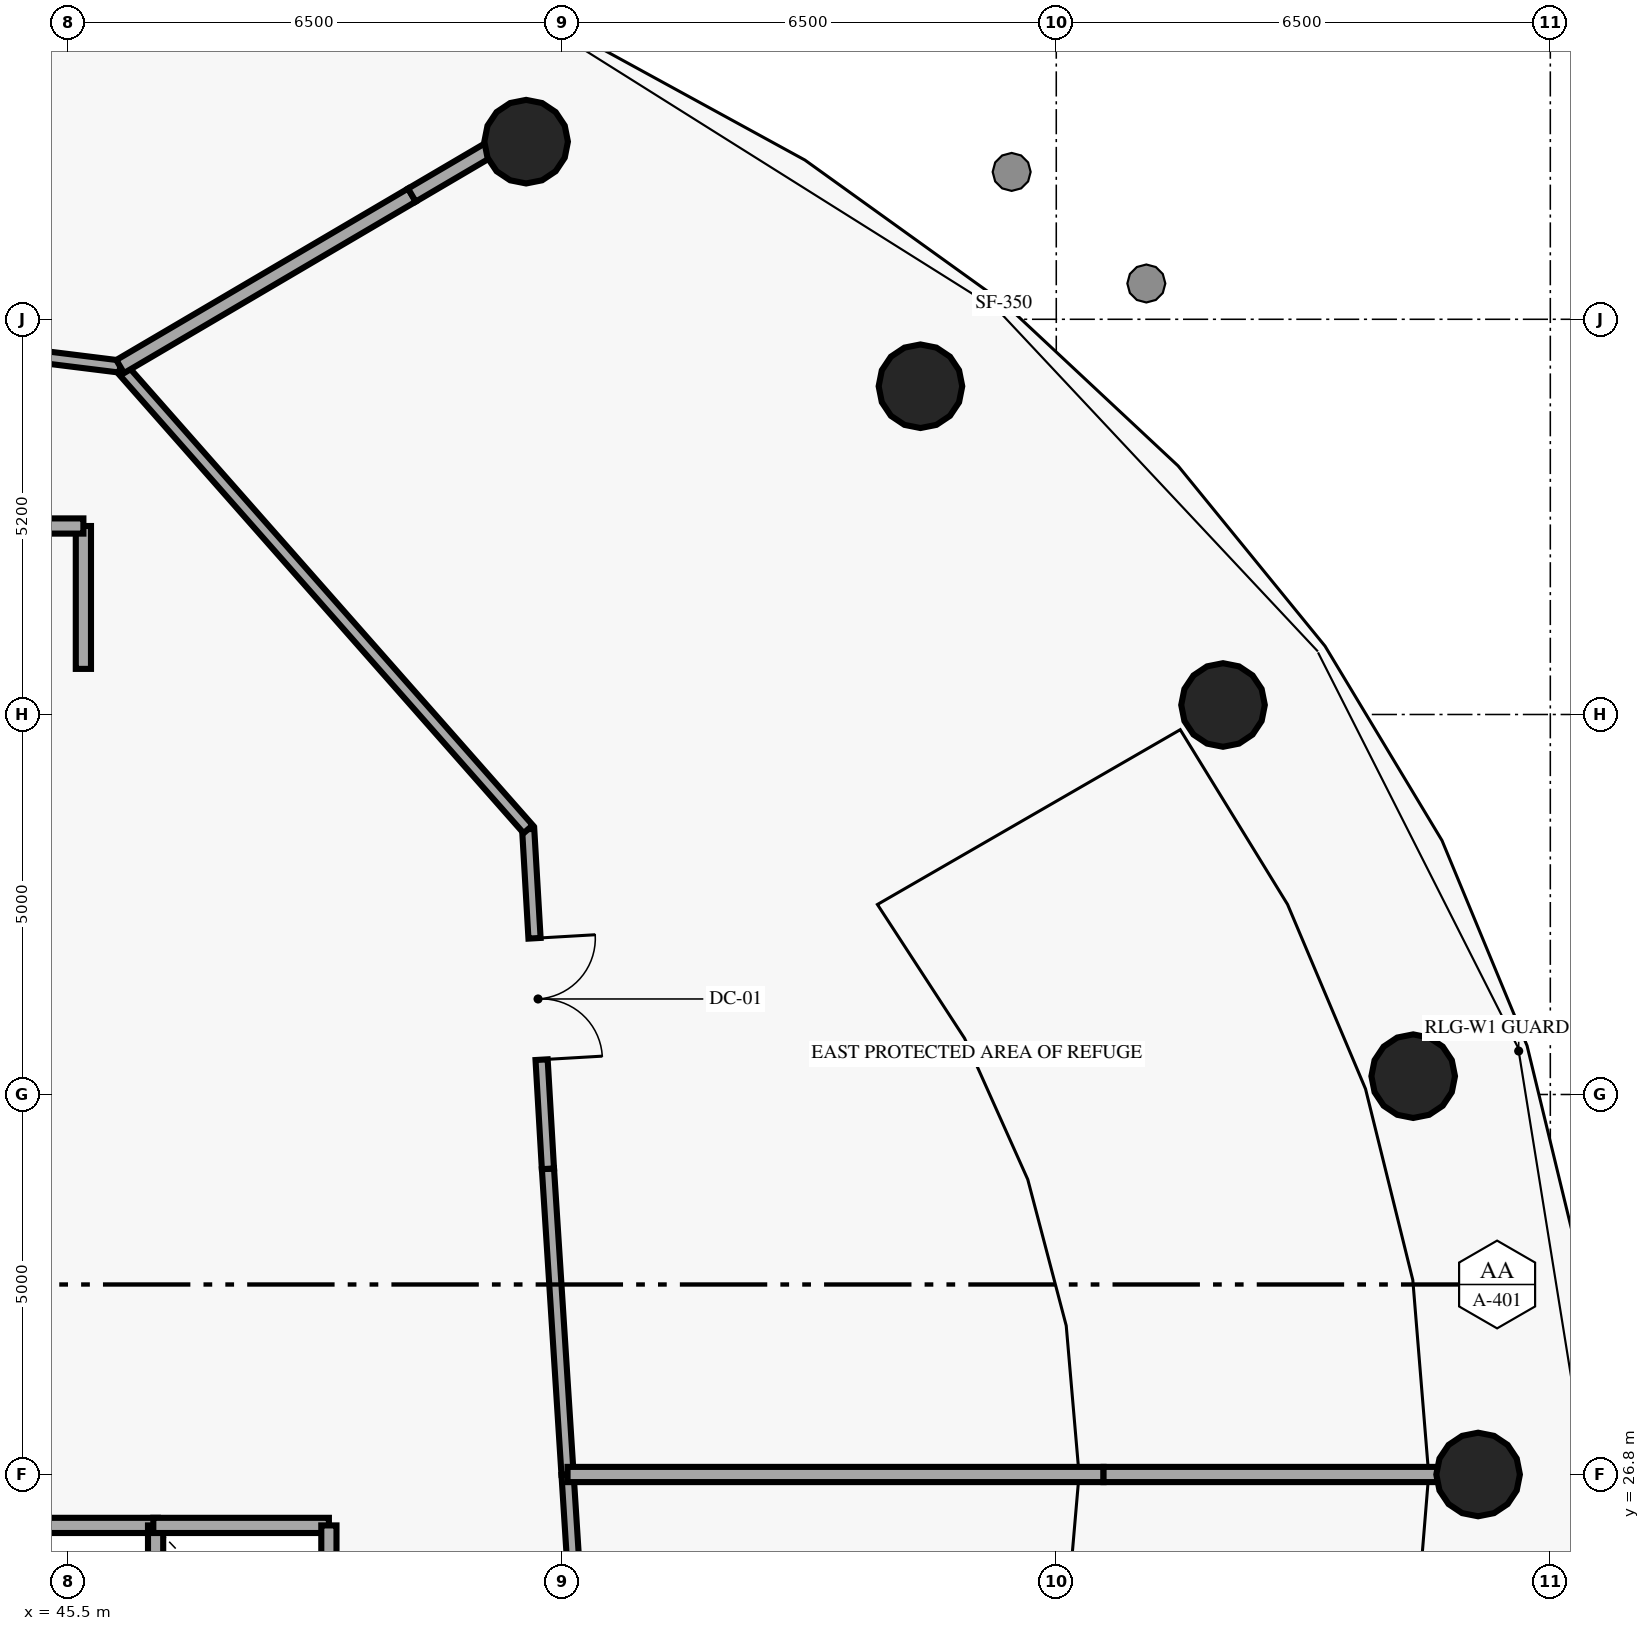
"""IFC4 building model, lengths in metres.
Left out: names, types, materials, properties, quantities, classifications, styles, units other than length and angle.
Written with IfcOpenShell. Run it as: python <this file> out.ifc"""

import sys

from ifc_helpers import new_model, si_unit, direction, frame, frame_2d, origin, origin_2d, place, context, subcontext, project, spatial, rectangle, circle, extrude, element, fill, save


model = new_model("IFC4")
c1 = context("Model", 3, precision=1e-05, world=origin(), true_north=direction((0.0, 1.0)))
c2 = subcontext(c1, "Body", "Model", "MODEL_VIEW")
j1 = project(units=[si_unit("LENGTHUNIT", "METRE"), si_unit("PLANEANGLEUNIT", "RADIAN")], contexts=[c1])
p1 = place(None, origin())
s1 = spatial("IfcSite", under=j1, at=p1, CompositionType="ELEMENT")
p2 = place(p1, origin())
s2 = spatial("IfcBuilding", under=s1, at=p2, CompositionType="ELEMENT")
p3 = place(p2, frame((0.0, 0.0, 106.05)))
s3 = spatial("IfcBuildingStorey", under=s2, at=p3, CompositionType="ELEMENT", Elevation=106.05)
for number, where, z_axis, x_axis in (
    (1, (64.05, 26.8, 0.0), (0.0, 0.0, 1.0), (1.0, 0.0, 0.0)),
    (2, (63.196, 32.041, 0.0), (0.0, 0.0, 1.0), (1.0, 0.0, 0.0)),
    (3, (60.694, 36.925, 0.0), (0.0, 0.0, 1.0), (1.0, 0.0, 0.0)),
    (4, (56.713, 41.119, 0.0), (0.0, 0.0, 1.0), (1.0, 0.0, 0.0)),
    (5, (51.525, 44.337, 0.0), (0.0, 0.0, 1.0), (1.0, 0.0, 0.0)),
):
    element("IfcColumn", number, at=place(p3, frame(where, z_axis=z_axis, x_axis=x_axis)), inside=s3, PredefinedType="COLUMN", context=c2, shape_type="SweptSolid", body=[
        extrude(circle(Radius=0.55, at=origin_2d()), origin(), (0.0, 0.0, 1.0), 6.88),
    ])
p4 = place(p3, frame((45.7, 37.4, 0.0), z_axis=(0.0, 0.0, 1.0), x_axis=(0.0, 1.0, 0.0)))
e6 = element("IfcWall", 6, at=p4, inside=s3, PredefinedType="SOLIDWALL", context=c2, shape_type="SweptSolid", body=[
    extrude(rectangle(XDim=1.88, YDim=0.2, at=frame_2d((0.94, 0.0))), origin(), (0.0, 0.0, 1.0), 6.88),
])
p5 = place(p3, frame((45.7, 39.28, 0.0), z_axis=(0.0, 0.0, 1.0), x_axis=(-1.0, 0.0, 0.0)))
e7 = element("IfcWall", 7, at=p5, inside=s3, PredefinedType="SOLIDWALL", context=c2, shape_type="SweptSolid", body=[
    extrude(rectangle(XDim=6.6, YDim=0.2, at=frame_2d((3.3, 0.0))), origin(), (0.0, 0.0, 1.0), 6.88),
])
p6 = place(p5, frame((4.35, 0.0, 0.0)))
e8 = element("IfcOpeningElement", 8, at=p6, cuts=e7, PredefinedType="OPENING", context=c2, shape_type="SweptSolid", body=[
    extrude(rectangle(XDim=1.6, YDim=2.2, at=frame_2d((0.8, 1.1))), frame((0.0, 0.11, 0.0), z_axis=(0.0, -1.0, 0.0), x_axis=(1.0, 0.0, 0.0)), (0.0, 0.0, 1.0), 0.22),
])
p7 = place(p3, frame((44.57, 26.13, 0.0), z_axis=(0.0, 0.0, 1.0), x_axis=(1.0, 0.0, 0.0)))
e9 = element("IfcWall", 9, at=p7, inside=s3, PredefinedType="SOLIDWALL", context=c2, shape_type="SweptSolid", body=[
    extrude(rectangle(XDim=2.11, YDim=0.2, at=frame_2d((1.055, 0.0))), origin(), (0.0, 0.0, 1.0), 6.88),
])
p8 = place(p3, frame((46.65, 23.72, 0.0), z_axis=(0.0, 0.0, 1.0), x_axis=(0.0, 1.0, 0.0)))
e10 = element("IfcWall", 10, at=p8, inside=s3, PredefinedType="SOLIDWALL", context=c2, shape_type="SweptSolid", body=[
    extrude(rectangle(XDim=2.41, YDim=0.2, at=frame_2d((1.205, 0.0))), origin(), (0.0, 0.0, 1.0), 6.88),
])
p9 = place(p3, frame((46.62, 26.13, 0.0), z_axis=(0.0, 0.0, 1.0), x_axis=(1.0, 0.0, 0.0)))
e11 = element("IfcWall", 11, at=p9, inside=s3, PredefinedType="SOLIDWALL", context=c2, shape_type="SweptSolid", body=[
    extrude(rectangle(XDim=2.31, YDim=0.2, at=frame_2d((1.155, 0.0))), origin(), (0.0, 0.0, 1.0), 6.88),
])
p10 = place(p3, frame((48.93, 23.72, 0.0), z_axis=(0.0, 0.0, 1.0), x_axis=(0.0, 1.0, 0.0)))
e12 = element("IfcWall", 12, at=p10, inside=s3, PredefinedType="SOLIDWALL", context=c2, shape_type="SweptSolid", body=[
    extrude(rectangle(XDim=2.41, YDim=0.2, at=frame_2d((1.205, 0.0))), origin(), (0.0, 0.0, 1.0), 6.88),
])
p11 = place(p3, frame((52.07, 26.8, 0.0), z_axis=(0.0, 0.0, 1.0), x_axis=(-0.064030047677, 0.997947971086, 0.0)))
e13 = element("IfcWall", 13, at=p11, inside=s3, PredefinedType="PARTITIONING", context=c2, shape_type="SweptSolid", body=[
    extrude(rectangle(XDim=4.03, YDim=0.16, at=frame_2d((2.015, 0.0))), origin(), (0.0, 0.0, 1.0), 6.88),
])
p12 = place(p3, frame((51.552, 35.291, 0.0), z_axis=(0.0, 0.0, 1.0), x_axis=(0.058082602913, -0.998311780577, 0.0)))
e14 = element("IfcWall", 14, at=p12, inside=s3, PredefinedType="PARTITIONING", context=c2, shape_type="SweptSolid", body=[
    extrude(rectangle(XDim=4.477, YDim=0.16, at=frame_2d((2.238, 0.0))), origin(), (0.0, 0.0, 1.0), 6.88),
])
p13 = place(p12, frame((1.438, 0.0, 0.0)))
e15 = element("IfcOpeningElement", 15, at=p13, cuts=e14, PredefinedType="OPENING", context=c2, shape_type="SweptSolid", body=[
    extrude(rectangle(XDim=1.6, YDim=2.2, at=frame_2d((0.8, 1.1))), frame((0.0, 0.09, 0.0), z_axis=(0.0, -1.0, 0.0), x_axis=(1.0, 0.0, 0.0)), (0.0, 0.0, 1.0), 0.18),
])
p14 = place(p3, frame((51.552, 35.291, 0.0), z_axis=(0.0, 0.0, 1.0), x_axis=(-0.661421630005, 0.750014284772, 0.0)))
e16 = element("IfcWall", 16, at=p14, inside=s3, PredefinedType="PARTITIONING", context=c2, shape_type="SweptSolid", body=[
    extrude(rectangle(XDim=8.116, YDim=0.16, at=frame_2d((4.058, 0.0))), origin(), (0.0, 0.0, 1.0), 6.88),
])
p15 = place(p3, frame((46.184, 41.378, 0.0), z_axis=(0.0, 0.0, 1.0), x_axis=(-0.992378204756, 0.12322945559, 0.0)))
e17 = element("IfcWall", 17, at=p15, inside=s3, PredefinedType="PARTITIONING", context=c2, shape_type="SweptSolid", body=[
    extrude(rectangle(XDim=7.239, YDim=0.16, at=frame_2d((3.62, 0.0))), origin(), (0.0, 0.0, 1.0), 6.88),
])
p16 = place(p3, frame((52.337, 22.614, 0.0), z_axis=(0.0, 0.0, 1.0), x_axis=(-0.063617518313, 0.997974354061, 0.0)))
e18 = element("IfcWall", 18, at=p16, inside=s3, PredefinedType="PARTITIONING", context=c2, shape_type="SweptSolid", body=[
    extrude(rectangle(XDim=4.195, YDim=0.16, at=frame_2d((2.097, 0.0))), origin(), (0.0, 0.0, 1.0), 6.88),
])
p17 = place(p3, frame((52.07, 26.8, 0.0), z_axis=(0.0, 0.0, 1.0), x_axis=(1.0, 0.0, 0.0)))
e19 = element("IfcWall", 19, at=p17, inside=s3, PredefinedType="SOLIDWALL", context=c2, shape_type="SweptSolid", body=[
    extrude(rectangle(XDim=7.052, YDim=0.2, at=frame_2d((3.526, 0.0))), origin(), (0.0, 0.0, 1.0), 6.88),
])
p18 = place(p3, frame((59.122, 26.8, 0.0), z_axis=(0.0, 0.0, 1.0), x_axis=(1.0, 0.0, 0.0)))
e20 = element("IfcWall", 20, at=p18, inside=s3, PredefinedType="SOLIDWALL", context=c2, shape_type="SweptSolid", body=[
    extrude(rectangle(XDim=5.243, YDim=0.2, at=frame_2d((2.622, 0.0))), origin(), (0.0, 0.0, 1.0), 4.88),
])
p19 = place(p3, frame((46.184, 41.378, 0.0), z_axis=(0.0, 0.0, 1.0), x_axis=(0.862079385068, 0.506773256833, 0.0)))
e21 = element("IfcWall", 21, at=p19, inside=s3, PredefinedType="SOLIDWALL", context=c2, shape_type="SweptSolid", body=[
    extrude(rectangle(XDim=4.452, YDim=0.2, at=frame_2d((2.226, 0.0))), origin(), (0.0, 0.0, 1.0), 6.88),
])
p20 = place(p3, frame((50.022, 43.634, 0.0), z_axis=(0.0, 0.0, 1.0), x_axis=(0.862175171179, 0.506610278421, 0.0)))
e22 = element("IfcWall", 22, at=p20, inside=s3, PredefinedType="SOLIDWALL", context=c2, shape_type="SweptSolid", body=[
    extrude(rectangle(XDim=1.927, YDim=0.2, at=frame_2d((0.963, 0.0))), origin(), (0.0, 0.0, 1.0), 5.43),
])
p21 = place(p13, origin())
e23 = element("IfcDoor", 23, at=p21, inside=s3, OperationType="DOUBLE_DOOR_SINGLE_SWING", PredefinedType="DOOR", context=c2, shape_type="SweptSolid", body=[
    extrude(rectangle(XDim=1.6, YDim=2.2, at=frame_2d((0.8, 1.1))), frame((0.0, 0.025, 0.0), z_axis=(0.0, -1.0, 0.0), x_axis=(1.0, 0.0, 0.0)), (0.0, 0.0, 1.0), 0.05),
])
fill(e15, e23)
save(model, sys.argv[1])
